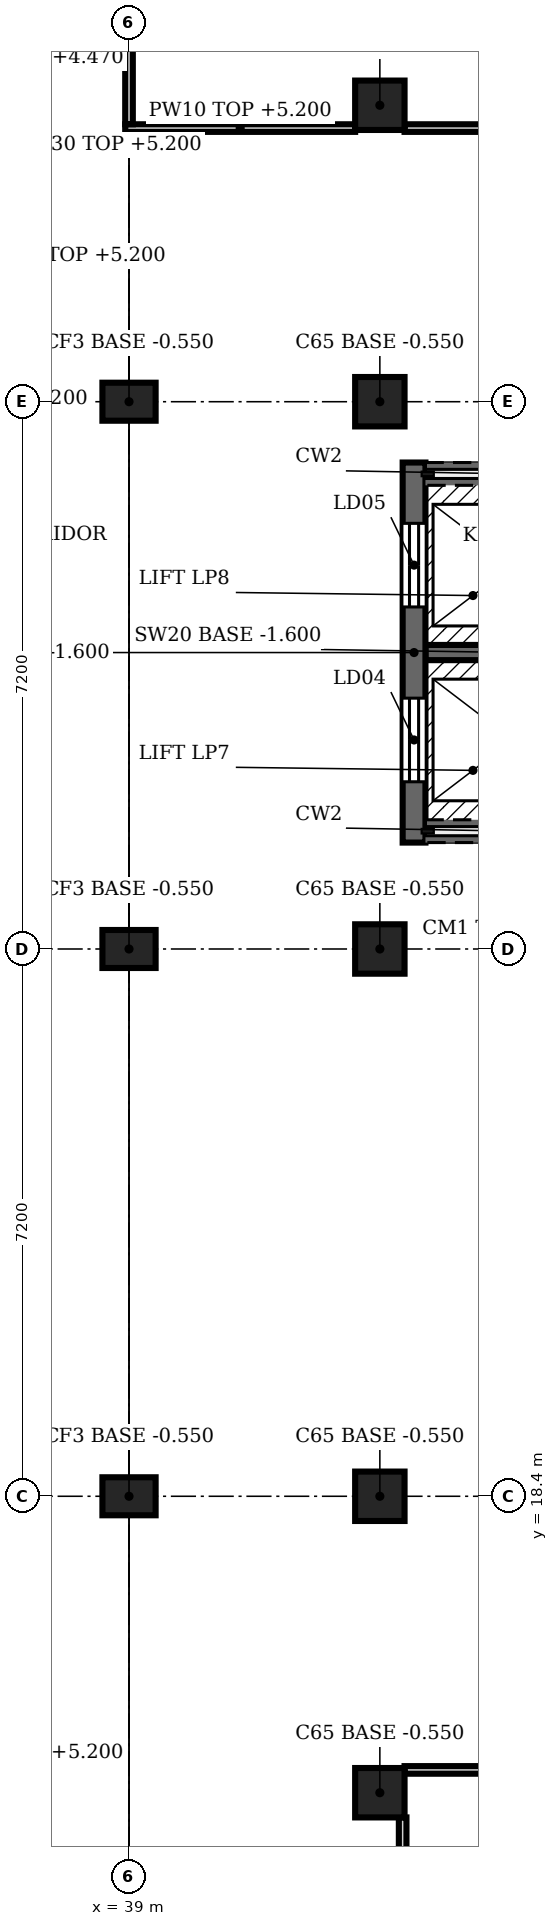
"""IFC4 building model, lengths in metres.
Left out: names, types, materials, properties, quantities, classifications, styles, units other than length and angle.
Written with IfcOpenShell. Run it as: python <this file> out.ifc"""

import sys

from ifc_helpers import new_model, si_unit, direction, frame, frame_2d, origin, origin_2d, place, context, subcontext, project, spatial, rectangle, extrude, element, fill, save


model = new_model("IFC4")
c1 = context("Model", 3, precision=1e-05, world=origin(), true_north=direction((0.0, 1.0)))
c2 = subcontext(c1, "Body", "Model", "MODEL_VIEW")
j1 = project(units=[si_unit("LENGTHUNIT", "METRE"), si_unit("PLANEANGLEUNIT", "RADIAN")], contexts=[c1])
p1 = place(None, origin())
s1 = spatial("IfcSite", under=j1, at=p1, CompositionType="ELEMENT")
p2 = place(p1, origin())
s2 = spatial("IfcBuilding", under=s1, at=p2, CompositionType="ELEMENT")
p3 = place(p2, origin())
s3 = spatial("IfcBuildingStorey", under=s2, at=p3, CompositionType="ELEMENT", Elevation=0.0)
for number, where, z_axis, x_axis in (
    (1, (39.0, 18.4, -0.55), (0.0, 0.0, 1.0), (1.0, 0.0, 0.0)),
    (2, (39.0, 25.6, -0.55), (0.0, 0.0, 1.0), (1.0, 0.0, 0.0)),
    (3, (39.0, 32.8, -0.55), (0.0, 0.0, 1.0), (1.0, 0.0, 0.0)),
):
    element("IfcColumn", number, at=place(p3, frame(where, z_axis=z_axis, x_axis=x_axis)), inside=s3, PredefinedType="COLUMN", context=c2, shape_type="SweptSolid", body=[
        extrude(rectangle(XDim=0.7, YDim=0.5, at=origin_2d()), origin(), (0.0, 0.0, 1.0), 5.95),
    ])
for number, where, z_axis, x_axis in (
    (4, (42.3, 14.5, -0.55), (0.0, 0.0, 1.0), (1.0, 0.0, 0.0)),
    (5, (42.3, 18.4, -0.55), (0.0, 0.0, 1.0), (1.0, 0.0, 0.0)),
    (6, (42.3, 25.6, -0.55), (0.0, 0.0, 1.0), (1.0, 0.0, 0.0)),
    (7, (42.3, 32.8, -0.55), (0.0, 0.0, 1.0), (1.0, 0.0, 0.0)),
    (8, (42.3, 36.7, -0.55), (0.0, 0.0, 1.0), (1.0, 0.0, 0.0)),
):
    element("IfcColumn", number, at=place(p3, frame(where, z_axis=z_axis, x_axis=x_axis)), inside=s3, PredefinedType="COLUMN", context=c2, shape_type="SweptSolid", body=[
        extrude(rectangle(XDim=0.65, YDim=0.65, at=origin_2d()), origin(), (0.0, 0.0, 1.0), 5.95),
    ])
p4 = place(p3, frame((42.625, 14.8, 0.0), z_axis=(0.0, 0.0, 1.0), x_axis=(1.0, 0.0, 0.0)))
e9 = element("IfcWall", 9, at=p4, inside=s3, PredefinedType="PARTITIONING", context=c2, shape_type="SweptSolid", body=[
    extrude(rectangle(XDim=3.625, YDim=0.1, at=frame_2d((1.812, 0.0))), origin(), (0.0, 0.0, 1.0), 4.27),
])
p5 = place(p3, frame((38.95, 36.4, 0.0), z_axis=(0.0, 0.0, 1.0), x_axis=(1.0, 0.0, 0.0)))
e10 = element("IfcWall", 10, at=p5, inside=s3, PredefinedType="PARTITIONING", context=c2, shape_type="SweptSolid", body=[
    extrude(rectangle(XDim=3.025, YDim=0.1, at=frame_2d((1.513, 0.0))), origin(), (0.0, 0.0, 1.0), 5.2),
])
p6 = place(p3, frame((42.625, 36.4, 0.0), z_axis=(0.0, 0.0, 1.0), x_axis=(1.0, 0.0, 0.0)))
e11 = element("IfcWall", 11, at=p6, inside=s3, PredefinedType="PARTITIONING", context=c2, shape_type="SweptSolid", body=[
    extrude(rectangle(XDim=5.65, YDim=0.1, at=frame_2d((2.825, 0.0))), origin(), (0.0, 0.0, 1.0), 4.27),
])
p7 = place(p3, frame((39.0, 36.45, 0.0), z_axis=(0.0, 0.0, 1.0), x_axis=(0.0, 1.0, 0.0)))
e12 = element("IfcWall", 12, at=p7, inside=s3, PredefinedType="PARTITIONING", context=c2, shape_type="SweptSolid", body=[
    extrude(rectangle(XDim=3.35, YDim=0.1, at=frame_2d((1.675, 0.0))), origin(), (0.0, 0.0, 1.0), 4.47),
])
p8 = place(p3, frame((42.6, 14.175, 0.0), z_axis=(0.0, 0.0, 1.0), x_axis=(0.0, -1.0, 0.0)))
e13 = element("IfcWall", 13, at=p8, inside=s3, PredefinedType="PARTITIONING", context=c2, shape_type="SweptSolid", body=[
    extrude(rectangle(XDim=2.875, YDim=0.1, at=frame_2d((1.438, 0.0))), origin(), (0.0, 0.0, 1.0), 5.2),
])
p9 = place(p8, frame((0.625, 0.0, 0.0)))
e14 = element("IfcOpeningElement", 14, at=p9, cuts=e13, PredefinedType="OPENING", context=c2, shape_type="SweptSolid", body=[
    extrude(rectangle(XDim=1.1, YDim=2.2, at=frame_2d((0.55, 1.1))), frame((0.0, 0.06, 0.0), z_axis=(0.0, -1.0, 0.0), x_axis=(1.0, 0.0, 0.0)), (0.0, 0.0, 1.0), 0.12),
])
p10 = place(p3, frame((42.75, 27.0, -1.6), z_axis=(0.0, 0.0, 1.0), x_axis=(0.0, 1.0, 0.0)))
e15 = element("IfcWall", 15, at=p10, inside=s3, PredefinedType="SHEAR", context=c2, shape_type="SweptSolid", body=[
    extrude(rectangle(XDim=5.0, YDim=0.3, at=frame_2d((2.5, 0.0))), origin(), (0.0, 0.0, 1.0), 7.0),
])
p11 = place(p10, frame((0.8, 0.0, 1.6)))
e16 = element("IfcOpeningElement", 16, at=p11, cuts=e15, PredefinedType="OPENING", context=c2, shape_type="SweptSolid", body=[
    extrude(rectangle(XDim=1.1, YDim=2.1, at=frame_2d((0.55, 1.05))), frame((0.0, 0.16, 0.0), z_axis=(0.0, -1.0, 0.0), x_axis=(1.0, 0.0, 0.0)), (0.0, 0.0, 1.0), 0.32),
])
p12 = place(p10, frame((3.1, 0.0, 1.6)))
e17 = element("IfcOpeningElement", 17, at=p12, cuts=e15, PredefinedType="OPENING", context=c2, shape_type="SweptSolid", body=[
    extrude(rectangle(XDim=1.1, YDim=2.1, at=frame_2d((0.55, 1.05))), frame((0.0, 0.16, 0.0), z_axis=(0.0, -1.0, 0.0), x_axis=(1.0, 0.0, 0.0)), (0.0, 0.0, 1.0), 0.32),
])
p13 = place(p3, frame((42.9, 29.5, -1.6), z_axis=(0.0, 0.0, 1.0), x_axis=(1.0, 0.0, 0.0)))
e18 = element("IfcWall", 18, at=p13, inside=s3, PredefinedType="SHEAR", context=c2, shape_type="SweptSolid", body=[
    extrude(rectangle(XDim=2.4, YDim=0.2, at=frame_2d((1.2, 0.0))), origin(), (0.0, 0.0, 1.0), 7.0),
])
for number, where, z_axis, x_axis in (
    (19, (42.9, 27.15, -1.6), (0.0, 0.0, 1.0), (1.0, 0.0, 0.0)),
    (20, (42.9, 31.85, -1.6), (0.0, 0.0, 1.0), (1.0, 0.0, 0.0)),
):
    element("IfcWall", number, at=place(p3, frame(where, z_axis=z_axis, x_axis=x_axis)), inside=s3, PredefinedType="SHEAR", context=c2, shape_type="SweptSolid", body=[
        extrude(rectangle(XDim=2.7, YDim=0.3, at=frame_2d((1.35, 0.0))), origin(), (0.0, 0.0, 1.0), 1.6),
    ])
p14 = place(p11, origin())
e21 = element("IfcDoor", 21, at=p14, inside=s3, OperationType="DOUBLE_DOOR_SLIDING", PredefinedType="DOOR", context=c2, shape_type="SweptSolid", body=[
    extrude(rectangle(XDim=1.1, YDim=2.1, at=frame_2d((0.55, 1.05))), frame((0.0, 0.025, 0.0), z_axis=(0.0, -1.0, 0.0), x_axis=(1.0, 0.0, 0.0)), (0.0, 0.0, 1.0), 0.05),
])
fill(e16, e21)
p15 = place(p12, origin())
e22 = element("IfcDoor", 22, at=p15, inside=s3, OperationType="DOUBLE_DOOR_SLIDING", PredefinedType="DOOR", context=c2, shape_type="SweptSolid", body=[
    extrude(rectangle(XDim=1.1, YDim=2.1, at=frame_2d((0.55, 1.05))), frame((0.0, 0.025, 0.0), z_axis=(0.0, -1.0, 0.0), x_axis=(1.0, 0.0, 0.0)), (0.0, 0.0, 1.0), 0.05),
])
fill(e17, e22)
save(model, sys.argv[1])
